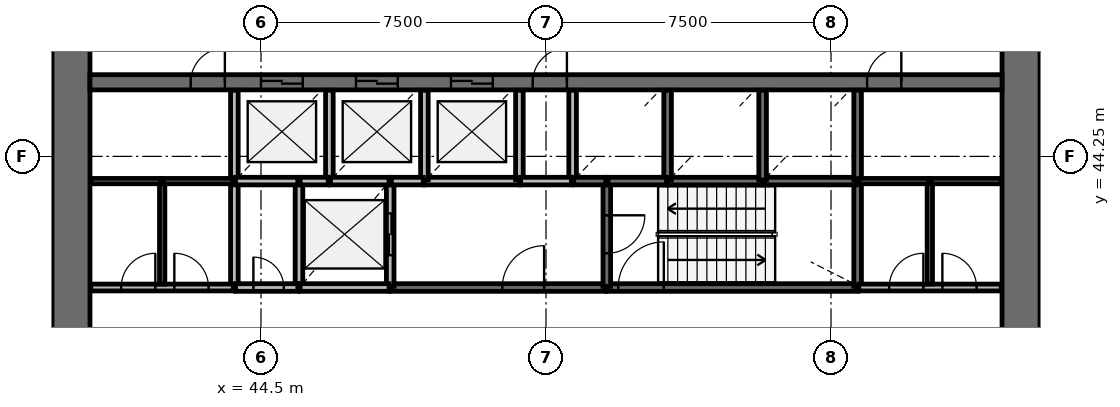
"""IFC4 building model, lengths in metres.
Left out: names, types, materials, properties, quantities, classifications, styles, units other than length and angle.
Written with IfcOpenShell. Run it as: python <this file> out.ifc"""

import sys

from ifc_helpers import new_model, si_unit, direction, frame, frame_2d, origin, place, context, subcontext, project, spatial, rectangle, extrude, source, transform, mapped, element, fill, save


model = new_model("IFC4")
c1 = context("Model", 3, precision=1e-05, world=origin(), true_north=direction((0.0, 1.0)))
c2 = subcontext(c1, "Body", "Model", "MODEL_VIEW")
j1 = project(units=[si_unit("LENGTHUNIT", "METRE"), si_unit("PLANEANGLEUNIT", "RADIAN")], contexts=[c1])
p1 = place(None, origin())
s1 = spatial("IfcSite", under=j1, at=p1, CompositionType="ELEMENT")
p2 = place(p1, origin())
s2 = spatial("IfcBuilding", under=s1, at=p2, CompositionType="ELEMENT")
p3 = place(p2, frame((0.0, 0.0, 66.6)))
s3 = spatial("IfcBuildingStorey", under=s2, at=p3, CompositionType="ELEMENT", Elevation=66.6)
p4 = place(p3, frame((64.5, 38.0, 0.0), z_axis=(0.0, 0.0, 1.0), x_axis=(0.0, 1.0, 0.0)))
e1 = element("IfcWall", 1, at=p4, inside=s3, PredefinedType="SHEAR", context=c2, shape_type="SweptSolid", body=[
    extrude(rectangle(XDim=20.0, YDim=1.0, at=frame_2d((10.0, 0.0))), origin(), (0.0, 0.0, 1.0), 4.4),
])
p5 = place(p4, frame((9.1, 0.0, 0.0)))
e2 = element("IfcOpeningElement", 2, at=p5, cuts=e1, PredefinedType="OPENING", context=c2, shape_type="SweptSolid", body=[
    extrude(rectangle(XDim=1.8, YDim=2.1, at=frame_2d((0.9, 1.05))), frame((0.0, 0.51, 0.0), z_axis=(0.0, -1.0, 0.0), x_axis=(1.0, 0.0, 0.0)), (0.0, 0.0, 1.0), 1.02),
])
p6 = place(p3, frame((39.5, 58.0, 0.0), z_axis=(0.0, 0.0, 1.0), x_axis=(0.0, -1.0, 0.0)))
e3 = element("IfcWall", 3, at=p6, inside=s3, PredefinedType="SHEAR", context=c2, shape_type="SweptSolid", body=[
    extrude(rectangle(XDim=20.0, YDim=1.0, at=frame_2d((10.0, 0.0))), origin(), (0.0, 0.0, 1.0), 4.4),
])
p7 = place(p6, frame((9.1, 0.0, 0.0)))
e4 = element("IfcOpeningElement", 4, at=p7, cuts=e3, PredefinedType="OPENING", context=c2, shape_type="SweptSolid", body=[
    extrude(rectangle(XDim=1.8, YDim=2.1, at=frame_2d((0.9, 1.05))), frame((0.0, 0.51, 0.0), z_axis=(0.0, -1.0, 0.0), x_axis=(1.0, 0.0, 0.0)), (0.0, 0.0, 1.0), 1.02),
])
p8 = place(p3, frame((40.0, 46.2, 0.0), z_axis=(0.0, 0.0, 1.0), x_axis=(1.0, 0.0, 0.0)))
e5 = element("IfcWall", 5, at=p8, inside=s3, PredefinedType="SHEAR", context=c2, shape_type="SweptSolid", body=[
    extrude(rectangle(XDim=24.0, YDim=0.4, at=frame_2d((12.0, 0.0))), origin(), (0.0, 0.0, 1.0), 4.4),
])
p9 = place(p8, frame((4.5, 0.0, 0.0)))
e6 = element("IfcOpeningElement", 6, at=p9, cuts=e5, PredefinedType="OPENING", context=c2, shape_type="SweptSolid", body=[
    extrude(rectangle(XDim=1.1, YDim=2.1, at=frame_2d((0.55, 1.05))), frame((0.0, 0.21, 0.0), z_axis=(0.0, -1.0, 0.0), x_axis=(1.0, 0.0, 0.0)), (0.0, 0.0, 1.0), 0.42),
])
p10 = place(p8, frame((7.0, 0.0, 0.0)))
e7 = element("IfcOpeningElement", 7, at=p10, cuts=e5, PredefinedType="OPENING", context=c2, shape_type="SweptSolid", body=[
    extrude(rectangle(XDim=1.1, YDim=2.1, at=frame_2d((0.55, 1.05))), frame((0.0, 0.21, 0.0), z_axis=(0.0, -1.0, 0.0), x_axis=(1.0, 0.0, 0.0)), (0.0, 0.0, 1.0), 0.42),
])
p11 = place(p8, frame((9.5, 0.0, 0.0)))
e8 = element("IfcOpeningElement", 8, at=p11, cuts=e5, PredefinedType="OPENING", context=c2, shape_type="SweptSolid", body=[
    extrude(rectangle(XDim=1.1, YDim=2.1, at=frame_2d((0.55, 1.05))), frame((0.0, 0.21, 0.0), z_axis=(0.0, -1.0, 0.0), x_axis=(1.0, 0.0, 0.0)), (0.0, 0.0, 1.0), 0.42),
])
p12 = place(p8, frame((20.45, 0.0, 0.0)))
e9 = element("IfcOpeningElement", 9, at=p12, cuts=e5, PredefinedType="OPENING", context=c2, shape_type="SweptSolid", body=[
    extrude(rectangle(XDim=0.9, YDim=2.1, at=frame_2d((0.45, 1.05))), frame((0.0, 0.21, 0.0), z_axis=(0.0, -1.0, 0.0), x_axis=(1.0, 0.0, 0.0)), (0.0, 0.0, 1.0), 0.42),
])
p13 = place(p8, frame((2.65, 0.0, 0.0)))
e10 = element("IfcOpeningElement", 10, at=p13, cuts=e5, PredefinedType="OPENING", context=c2, shape_type="SweptSolid", body=[
    extrude(rectangle(XDim=0.9, YDim=2.1, at=frame_2d((0.45, 1.05))), frame((0.0, 0.21, 0.0), z_axis=(0.0, -1.0, 0.0), x_axis=(1.0, 0.0, 0.0)), (0.0, 0.0, 1.0), 0.42),
])
p14 = place(p8, frame((11.65, 0.0, 0.0)))
e11 = element("IfcOpeningElement", 11, at=p14, cuts=e5, PredefinedType="OPENING", context=c2, shape_type="SweptSolid", body=[
    extrude(rectangle(XDim=0.9, YDim=2.1, at=frame_2d((0.45, 1.05))), frame((0.0, 0.21, 0.0), z_axis=(0.0, -1.0, 0.0), x_axis=(1.0, 0.0, 0.0)), (0.0, 0.0, 1.0), 0.42),
])
p15 = place(p3, frame((53.6, 40.8, 0.0), z_axis=(0.0, 0.0, 1.0), x_axis=(1.0, 0.0, 0.0)))
e12 = element("IfcWall", 12, at=p15, inside=s3, PredefinedType="SOLIDWALL", context=c2, shape_type="SweptSolid", body=[
    extrude(rectangle(XDim=6.6, YDim=0.2, at=frame_2d((3.3, 0.0))), origin(), (0.0, 0.0, 1.0), 3.95),
])
p16 = place(p15, frame((0.3, 0.0, 0.0)))
e13 = element("IfcOpeningElement", 13, at=p16, cuts=e12, PredefinedType="OPENING", context=c2, shape_type="SweptSolid", body=[
    extrude(rectangle(XDim=1.2, YDim=2.1, at=frame_2d((0.6, 1.05))), frame((0.0, 0.11, 0.0), z_axis=(0.0, -1.0, 0.0), x_axis=(1.0, 0.0, 0.0)), (0.0, 0.0, 1.0), 0.22),
])
p17 = place(p3, frame((47.9, 40.8, 0.0), z_axis=(0.0, 0.0, 1.0), x_axis=(1.0, 0.0, 0.0)))
e14 = element("IfcWall", 14, at=p17, inside=s3, PredefinedType="SOLIDWALL", context=c2, shape_type="SweptSolid", body=[
    extrude(rectangle(XDim=5.67, YDim=0.2, at=frame_2d((2.835, 0.0))), origin(), (0.0, 0.0, 1.0), 3.95),
])
p18 = place(p17, frame((2.95, 0.0, 0.0)))
e15 = element("IfcOpeningElement", 15, at=p18, cuts=e14, PredefinedType="OPENING", context=c2, shape_type="SweptSolid", body=[
    extrude(rectangle(XDim=1.1, YDim=2.1, at=frame_2d((0.55, 1.05))), frame((0.0, 0.11, 0.0), z_axis=(0.0, -1.0, 0.0), x_axis=(1.0, 0.0, 0.0)), (0.0, 0.0, 1.0), 0.22),
])
for number, where, z_axis, x_axis in (
    (16, (43.8, 43.6, 0.0), (0.0, 0.0, 1.0), (0.0, -1.0, 0.0)),
    (17, (45.5, 43.6, 0.0), (0.0, 0.0, 1.0), (0.0, -1.0, 0.0)),
):
    element("IfcWall", number, at=place(p3, frame(where, z_axis=z_axis, x_axis=x_axis)), inside=s3, PredefinedType="SOLIDWALL", context=c2, shape_type="SweptSolid", body=[
        extrude(rectangle(XDim=2.8, YDim=0.2, at=frame_2d((1.4, 0.0))), origin(), (0.0, 0.0, 1.0), 3.95),
    ])
p19 = place(p3, frame((47.9, 40.83, 0.0), z_axis=(0.0, 0.0, 1.0), x_axis=(0.0, 1.0, 0.0)))
e18 = element("IfcWall", 18, at=p19, inside=s3, PredefinedType="SOLIDWALL", context=c2, shape_type="SweptSolid", body=[
    extrude(rectangle(XDim=2.77, YDim=0.2, at=frame_2d((1.385, 0.0))), origin(), (0.0, 0.0, 1.0), 3.95),
])
p20 = place(p19, frame((0.82, 0.0, 0.0)))
e19 = element("IfcOpeningElement", 19, at=p20, cuts=e18, PredefinedType="OPENING", context=c2, shape_type="SweptSolid", body=[
    extrude(rectangle(XDim=1.1, YDim=2.1, at=frame_2d((0.55, 1.05))), frame((0.0, 0.11, 0.0), z_axis=(0.0, -1.0, 0.0), x_axis=(1.0, 0.0, 0.0)), (0.0, 0.0, 1.0), 0.22),
])
p21 = place(p3, frame((60.2, 40.83, 0.0), z_axis=(0.0, 0.0, 1.0), x_axis=(0.0, 1.0, 0.0)))
e20 = element("IfcWall", 20, at=p21, inside=s3, PredefinedType="SOLIDWALL", context=c2, shape_type="SweptSolid", body=[
    extrude(rectangle(XDim=2.77, YDim=0.2, at=frame_2d((1.385, 0.0))), origin(), (0.0, 0.0, 1.0), 3.95),
])
p22 = place(p3, frame((53.6, 43.6, 0.0), z_axis=(0.0, 0.0, 1.0), x_axis=(0.0, -1.0, 0.0)))
e21 = element("IfcWall", 21, at=p22, inside=s3, PredefinedType="SOLIDWALL", context=c2, shape_type="SweptSolid", body=[
    extrude(rectangle(XDim=2.77, YDim=0.2, at=frame_2d((1.385, 0.0))), origin(), (0.0, 0.0, 1.0), 3.95),
])
p23 = place(p22, frame((0.9, 0.0, 0.0)))
e22 = element("IfcOpeningElement", 22, at=p23, cuts=e21, PredefinedType="OPENING", context=c2, shape_type="SweptSolid", body=[
    extrude(rectangle(XDim=1.0, YDim=2.1, at=frame_2d((0.5, 1.05))), frame((0.0, 0.11, 0.0), z_axis=(0.0, -1.0, 0.0), x_axis=(1.0, 0.0, 0.0)), (0.0, 0.0, 1.0), 0.22),
])
for number, where, z_axis, x_axis in (
    (23, (48.8, 43.6, 0.0), (0.0, 0.0, 1.0), (1.0, 0.0, 0.0)),
    (24, (55.2, 43.6, 0.0), (0.0, 0.0, 1.0), (1.0, 0.0, 0.0)),
):
    element("IfcWall", number, at=place(p3, frame(where, z_axis=z_axis, x_axis=x_axis)), inside=s3, PredefinedType="SOLIDWALL", context=c2, shape_type="SweptSolid", body=[
        extrude(rectangle(XDim=2.5, YDim=0.2, at=frame_2d((1.25, 0.0))), origin(), (0.0, 0.0, 1.0), 3.95),
    ])
p24 = place(p3, frame((57.73, 43.6, 0.0), z_axis=(0.0, 0.0, 1.0), x_axis=(1.0, 0.0, 0.0)))
e25 = element("IfcWall", 25, at=p24, inside=s3, PredefinedType="SOLIDWALL", context=c2, shape_type="SweptSolid", body=[
    extrude(rectangle(XDim=2.44, YDim=0.2, at=frame_2d((1.22, 0.0))), origin(), (0.0, 0.0, 1.0), 3.95),
])
p25 = place(p3, frame((45.53, 40.8, 0.0), z_axis=(0.0, 0.0, 1.0), x_axis=(1.0, 0.0, 0.0)))
e26 = element("IfcWall", 26, at=p25, inside=s3, PredefinedType="SOLIDWALL", context=c2, shape_type="SweptSolid", body=[
    extrude(rectangle(XDim=2.34, YDim=0.2, at=frame_2d((1.17, 0.0))), origin(), (0.0, 0.0, 1.0), 3.95),
])
p26 = place(p3, frame((43.8, 45.99, 0.0), z_axis=(0.0, 0.0, 1.0), x_axis=(0.0, -1.0, 0.0)))
e27 = element("IfcWall", 27, at=p26, inside=s3, PredefinedType="SOLIDWALL", context=c2, shape_type="SweptSolid", body=[
    extrude(rectangle(XDim=2.36, YDim=0.2, at=frame_2d((1.18, 0.0))), origin(), (0.0, 0.0, 1.0), 3.95),
])
p27 = place(p3, frame((46.3, 43.6, 0.0), z_axis=(0.0, 0.0, 1.0), x_axis=(0.0, 1.0, 0.0)))
e28 = element("IfcWall", 28, at=p27, inside=s3, PredefinedType="SOLIDWALL", context=c2, shape_type="SweptSolid", body=[
    extrude(rectangle(XDim=2.39, YDim=0.2, at=frame_2d((1.195, 0.0))), origin(), (0.0, 0.0, 1.0), 3.95),
])
for number, where, z_axis, x_axis in (
    (29, (48.8, 43.63, 0.0), (0.0, 0.0, 1.0), (0.0, 1.0, 0.0)),
    (30, (51.3, 43.63, 0.0), (0.0, 0.0, 1.0), (0.0, 1.0, 0.0)),
):
    element("IfcWall", number, at=place(p3, frame(where, z_axis=z_axis, x_axis=x_axis)), inside=s3, PredefinedType="SOLIDWALL", context=c2, shape_type="SweptSolid", body=[
        extrude(rectangle(XDim=2.36, YDim=0.2, at=frame_2d((1.18, 0.0))), origin(), (0.0, 0.0, 1.0), 3.95),
    ])
p28 = place(p3, frame((52.7, 45.99, 0.0), z_axis=(0.0, 0.0, 1.0), x_axis=(0.0, -1.0, 0.0)))
e31 = element("IfcWall", 31, at=p28, inside=s3, PredefinedType="SOLIDWALL", context=c2, shape_type="SweptSolid", body=[
    extrude(rectangle(XDim=2.39, YDim=0.2, at=frame_2d((1.195, 0.0))), origin(), (0.0, 0.0, 1.0), 3.95),
])
for number, where, z_axis, x_axis in (
    (32, (55.2, 43.63, 0.0), (0.0, 0.0, 1.0), (0.0, 1.0, 0.0)),
    (33, (57.7, 43.63, 0.0), (0.0, 0.0, 1.0), (0.0, 1.0, 0.0)),
    (34, (60.2, 43.63, 0.0), (0.0, 0.0, 1.0), (0.0, 1.0, 0.0)),
):
    element("IfcWall", number, at=place(p3, frame(where, z_axis=z_axis, x_axis=x_axis)), inside=s3, PredefinedType="SOLIDWALL", context=c2, shape_type="SweptSolid", body=[
        extrude(rectangle(XDim=2.36, YDim=0.2, at=frame_2d((1.18, 0.0))), origin(), (0.0, 0.0, 1.0), 3.95),
    ])
p29 = place(p3, frame((43.83, 43.6, 0.0), z_axis=(0.0, 0.0, 1.0), x_axis=(1.0, 0.0, 0.0)))
e35 = element("IfcWall", 35, at=p29, inside=s3, PredefinedType="SOLIDWALL", context=c2, shape_type="SweptSolid", body=[
    extrude(rectangle(XDim=1.64, YDim=0.2, at=frame_2d((0.82, 0.0))), origin(), (0.0, 0.0, 1.0), 3.95),
])
p30 = place(p3, frame((43.83, 40.8, 0.0), z_axis=(0.0, 0.0, 1.0), x_axis=(1.0, 0.0, 0.0)))
e36 = element("IfcWall", 36, at=p30, inside=s3, PredefinedType="SOLIDWALL", context=c2, shape_type="SweptSolid", body=[
    extrude(rectangle(XDim=1.64, YDim=0.2, at=frame_2d((0.82, 0.0))), origin(), (0.0, 0.0, 1.0), 3.95),
])
p31 = place(p30, frame((0.47, 0.0, 0.0)))
e37 = element("IfcOpeningElement", 37, at=p31, cuts=e36, PredefinedType="OPENING", context=c2, shape_type="SweptSolid", body=[
    extrude(rectangle(XDim=0.8, YDim=2.1, at=frame_2d((0.4, 1.05))), frame((0.0, 0.11, 0.0), z_axis=(0.0, -1.0, 0.0), x_axis=(1.0, 0.0, 0.0)), (0.0, 0.0, 1.0), 0.22),
])
for number, where, z_axis, x_axis in (
    (38, (46.33, 43.6, 0.0), (0.0, 0.0, 1.0), (1.0, 0.0, 0.0)),
    (39, (53.63, 43.6, 0.0), (0.0, 0.0, 1.0), (1.0, 0.0, 0.0)),
):
    element("IfcWall", number, at=place(p3, frame(where, z_axis=z_axis, x_axis=x_axis)), inside=s3, PredefinedType="SOLIDWALL", context=c2, shape_type="SweptSolid", body=[
        extrude(rectangle(XDim=1.54, YDim=0.2, at=frame_2d((0.77, 0.0))), origin(), (0.0, 0.0, 1.0), 3.95),
    ])
p32 = place(p3, frame((52.67, 43.6, 0.0), z_axis=(0.0, 0.0, 1.0), x_axis=(-1.0, 0.0, 0.0)))
e40 = element("IfcWall", 40, at=p32, inside=s3, PredefinedType="SOLIDWALL", context=c2, shape_type="SweptSolid", body=[
    extrude(rectangle(XDim=1.34, YDim=0.2, at=frame_2d((0.67, 0.0))), origin(), (0.0, 0.0, 1.0), 3.95),
])
for number, where, z_axis, x_axis in (
    (41, (47.93, 43.6, 0.0), (0.0, 0.0, 1.0), (1.0, 0.0, 0.0)),
    (42, (52.73, 43.6, 0.0), (0.0, 0.0, 1.0), (1.0, 0.0, 0.0)),
):
    element("IfcWall", number, at=place(p3, frame(where, z_axis=z_axis, x_axis=x_axis)), inside=s3, PredefinedType="SOLIDWALL", context=c2, shape_type="SweptSolid", body=[
        extrude(rectangle(XDim=0.84, YDim=0.2, at=frame_2d((0.42, 0.0))), origin(), (0.0, 0.0, 1.0), 3.95),
    ])
p33 = place(p3, frame((45.53, 43.6, 0.0), z_axis=(0.0, 0.0, 1.0), x_axis=(1.0, 0.0, 0.0)))
e43 = element("IfcWall", 43, at=p33, inside=s3, PredefinedType="SOLIDWALL", context=c2, shape_type="SweptSolid", body=[
    extrude(rectangle(XDim=0.74, YDim=0.2, at=frame_2d((0.37, 0.0))), origin(), (0.0, 0.0, 1.0), 3.95),
])
p34 = place(p3, frame((40.02, 40.8, 0.0), z_axis=(0.0, 0.0, 1.0), x_axis=(1.0, 0.0, 0.0)))
e44 = element("IfcWall", 44, at=p34, inside=s3, PredefinedType="PARTITIONING", context=c2, shape_type="SweptSolid", body=[
    extrude(rectangle(XDim=3.75, YDim=0.18, at=frame_2d((1.875, 0.0))), origin(), (0.0, 0.0, 1.0), 3.95),
])
p35 = place(p34, frame((0.8, 0.0, 0.0)))
e45 = element("IfcOpeningElement", 45, at=p35, cuts=e44, PredefinedType="OPENING", context=c2, shape_type="SweptSolid", body=[
    extrude(rectangle(XDim=0.9, YDim=2.1, at=frame_2d((0.45, 1.05))), frame((0.0, 0.1, 0.0), z_axis=(0.0, -1.0, 0.0), x_axis=(1.0, 0.0, 0.0)), (0.0, 0.0, 1.0), 0.2),
])
p36 = place(p34, frame((2.2, 0.0, 0.0)))
e46 = element("IfcOpeningElement", 46, at=p36, cuts=e44, PredefinedType="OPENING", context=c2, shape_type="SweptSolid", body=[
    extrude(rectangle(XDim=0.9, YDim=2.1, at=frame_2d((0.45, 1.05))), frame((0.0, 0.1, 0.0), z_axis=(0.0, -1.0, 0.0), x_axis=(1.0, 0.0, 0.0)), (0.0, 0.0, 1.0), 0.2),
])
p37 = place(p3, frame((60.23, 40.8, 0.0), z_axis=(0.0, 0.0, 1.0), x_axis=(1.0, 0.0, 0.0)))
e47 = element("IfcWall", 47, at=p37, inside=s3, PredefinedType="PARTITIONING", context=c2, shape_type="SweptSolid", body=[
    extrude(rectangle(XDim=3.75, YDim=0.18, at=frame_2d((1.875, 0.0))), origin(), (0.0, 0.0, 1.0), 3.95),
])
p38 = place(p37, frame((0.8, 0.0, 0.0)))
e48 = element("IfcOpeningElement", 48, at=p38, cuts=e47, PredefinedType="OPENING", context=c2, shape_type="SweptSolid", body=[
    extrude(rectangle(XDim=0.9, YDim=2.1, at=frame_2d((0.45, 1.05))), frame((0.0, 0.1, 0.0), z_axis=(0.0, -1.0, 0.0), x_axis=(1.0, 0.0, 0.0)), (0.0, 0.0, 1.0), 0.2),
])
p39 = place(p37, frame((2.2, 0.0, 0.0)))
e49 = element("IfcOpeningElement", 49, at=p39, cuts=e47, PredefinedType="OPENING", context=c2, shape_type="SweptSolid", body=[
    extrude(rectangle(XDim=0.9, YDim=2.1, at=frame_2d((0.45, 1.05))), frame((0.0, 0.1, 0.0), z_axis=(0.0, -1.0, 0.0), x_axis=(1.0, 0.0, 0.0)), (0.0, 0.0, 1.0), 0.2),
])
for number, where, z_axis, x_axis in (
    (50, (41.9, 40.89, 0.0), (0.0, 0.0, 1.0), (0.0, 1.0, 0.0)),
    (51, (62.1, 40.89, 0.0), (0.0, 0.0, 1.0), (0.0, 1.0, 0.0)),
):
    element("IfcWall", number, at=place(p3, frame(where, z_axis=z_axis, x_axis=x_axis)), inside=s3, PredefinedType="PARTITIONING", context=c2, shape_type="SweptSolid", body=[
        extrude(rectangle(XDim=2.71, YDim=0.14, at=frame_2d((1.355, 0.0))), origin(), (0.0, 0.0, 1.0), 3.05),
    ])
for number, where, z_axis, x_axis in (
    (52, (43.77, 43.6, 0.0), (0.0, 0.0, 1.0), (-1.0, 0.0, 0.0)),
    (53, (60.23, 43.6, 0.0), (0.0, 0.0, 1.0), (1.0, 0.0, 0.0)),
):
    element("IfcWall", number, at=place(p3, frame(where, z_axis=z_axis, x_axis=x_axis)), inside=s3, PredefinedType="PARTITIONING", context=c2, shape_type="SweptSolid", body=[
        extrude(rectangle(XDim=1.84, YDim=0.14, at=frame_2d((0.92, 0.0))), origin(), (0.0, 0.0, 1.0), 3.05),
    ])
for number, where, z_axis, x_axis in (
    (54, (41.87, 43.6, 0.0), (0.0, 0.0, 1.0), (-1.0, 0.0, 0.0)),
    (55, (62.13, 43.6, 0.0), (0.0, 0.0, 1.0), (1.0, 0.0, 0.0)),
):
    element("IfcWall", number, at=place(p3, frame(where, z_axis=z_axis, x_axis=x_axis)), inside=s3, PredefinedType="PARTITIONING", context=c2, shape_type="SweptSolid", body=[
        extrude(rectangle(XDim=1.85, YDim=0.14, at=frame_2d((0.925, 0.0))), origin(), (0.0, 0.0, 1.0), 3.05),
    ])
m1 = source(origin(), c2, "Body", "SweptSolid", [
    extrude(rectangle(XDim=1.1, YDim=2.1, at=frame_2d((0.55, 1.05))), frame((0.0, 0.025, 0.0), z_axis=(0.0, -1.0, 0.0), x_axis=(1.0, 0.0, 0.0)), (0.0, 0.0, 1.0), 0.05),
])
p40 = place(p9, origin())
e56 = element("IfcDoor", 56, at=p40, inside=s3, OperationType="DOUBLE_DOOR_SLIDING", PredefinedType="USERDEFINED", context=c2, shape_type="MappedRepresentation", body=[
    mapped(m1, transform((0.0, 0.0, 0.0), scale=1.0)),
])
fill(e6, e56)
p41 = place(p10, origin())
e57 = element("IfcDoor", 57, at=p41, inside=s3, OperationType="DOUBLE_DOOR_SLIDING", PredefinedType="USERDEFINED", context=c2, shape_type="MappedRepresentation", body=[
    mapped(m1, transform((0.0, 0.0, 0.0), scale=1.0)),
])
fill(e7, e57)
p42 = place(p11, origin())
e58 = element("IfcDoor", 58, at=p42, inside=s3, OperationType="DOUBLE_DOOR_SLIDING", PredefinedType="USERDEFINED", context=c2, shape_type="MappedRepresentation", body=[
    mapped(m1, transform((0.0, 0.0, 0.0), scale=1.0)),
])
fill(e8, e58)
p43 = place(p20, origin())
e59 = element("IfcDoor", 59, at=p43, inside=s3, OperationType="DOUBLE_DOOR_SLIDING", PredefinedType="USERDEFINED", context=c2, shape_type="MappedRepresentation", body=[
    mapped(m1, transform((0.0, 0.0, 0.0), scale=1.0)),
])
fill(e19, e59)
m2 = source(origin(), c2, "Body", "SweptSolid", [
    extrude(rectangle(XDim=1.2, YDim=2.1, at=frame_2d((0.6, 1.05))), frame((0.0, 0.025, 0.0), z_axis=(0.0, -1.0, 0.0), x_axis=(1.0, 0.0, 0.0)), (0.0, 0.0, 1.0), 0.05),
])
p44 = place(p16, origin())
e60 = element("IfcDoor", 60, at=p44, inside=s3, OperationType="SINGLE_SWING_RIGHT", PredefinedType="DOOR", context=c2, shape_type="MappedRepresentation", body=[
    mapped(m2, transform((0.0, 0.0, 0.0), scale=1.0)),
])
fill(e13, e60)
m3 = source(origin(), c2, "Body", "SweptSolid", [
    extrude(rectangle(XDim=1.0, YDim=2.1, at=frame_2d((0.5, 1.05))), frame((0.0, 0.025, 0.0), z_axis=(0.0, -1.0, 0.0), x_axis=(1.0, 0.0, 0.0)), (0.0, 0.0, 1.0), 0.05),
])
p45 = place(p23, origin())
e61 = element("IfcDoor", 61, at=p45, inside=s3, OperationType="SINGLE_SWING_LEFT", PredefinedType="DOOR", context=c2, shape_type="MappedRepresentation", body=[
    mapped(m3, transform((0.0, 0.0, 0.0), scale=1.0)),
])
fill(e22, e61)
m4 = source(origin(), c2, "Body", "SweptSolid", [
    extrude(rectangle(XDim=1.1, YDim=2.1, at=frame_2d((0.55, 1.05))), frame((0.0, 0.025, 0.0), z_axis=(0.0, -1.0, 0.0), x_axis=(1.0, 0.0, 0.0)), (0.0, 0.0, 1.0), 0.05),
])
p46 = place(p18, origin())
e62 = element("IfcDoor", 62, at=p46, inside=s3, OperationType="SINGLE_SWING_RIGHT", PredefinedType="DOOR", context=c2, shape_type="MappedRepresentation", body=[
    mapped(m4, transform((0.0, 0.0, 0.0), scale=1.0)),
])
fill(e15, e62)
m5 = source(origin(), c2, "Body", "SweptSolid", [
    extrude(rectangle(XDim=0.8, YDim=2.1, at=frame_2d((0.4, 1.05))), frame((0.0, 0.025, 0.0), z_axis=(0.0, -1.0, 0.0), x_axis=(1.0, 0.0, 0.0)), (0.0, 0.0, 1.0), 0.05),
])
p47 = place(p31, origin())
e63 = element("IfcDoor", 63, at=p47, inside=s3, OperationType="SINGLE_SWING_LEFT", PredefinedType="DOOR", context=c2, shape_type="MappedRepresentation", body=[
    mapped(m5, transform((0.0, 0.0, 0.0), scale=1.0)),
])
fill(e37, e63)
m6 = source(origin(), c2, "Body", "SweptSolid", [
    extrude(rectangle(XDim=0.9, YDim=2.1, at=frame_2d((0.45, 1.05))), frame((0.0, 0.025, 0.0), z_axis=(0.0, -1.0, 0.0), x_axis=(1.0, 0.0, 0.0)), (0.0, 0.0, 1.0), 0.05),
])
p48 = place(p35, origin())
e64 = element("IfcDoor", 64, at=p48, inside=s3, OperationType="SINGLE_SWING_RIGHT", PredefinedType="DOOR", context=c2, shape_type="MappedRepresentation", body=[
    mapped(m6, transform((0.0, 0.0, 0.0), scale=1.0)),
])
fill(e45, e64)
p49 = place(p36, origin())
e65 = element("IfcDoor", 65, at=p49, inside=s3, OperationType="SINGLE_SWING_LEFT", PredefinedType="DOOR", context=c2, shape_type="MappedRepresentation", body=[
    mapped(m6, transform((0.0, 0.0, 0.0), scale=1.0)),
])
fill(e46, e65)
p50 = place(p12, origin())
e66 = element("IfcDoor", 66, at=p50, inside=s3, OperationType="SINGLE_SWING_RIGHT", PredefinedType="DOOR", context=c2, shape_type="MappedRepresentation", body=[
    mapped(m6, transform((0.0, 0.0, 0.0), scale=1.0)),
])
fill(e9, e66)
p51 = place(p38, origin())
e67 = element("IfcDoor", 67, at=p51, inside=s3, OperationType="SINGLE_SWING_RIGHT", PredefinedType="DOOR", context=c2, shape_type="MappedRepresentation", body=[
    mapped(m6, transform((0.0, 0.0, 0.0), scale=1.0)),
])
fill(e48, e67)
p52 = place(p39, origin())
e68 = element("IfcDoor", 68, at=p52, inside=s3, OperationType="SINGLE_SWING_LEFT", PredefinedType="DOOR", context=c2, shape_type="MappedRepresentation", body=[
    mapped(m6, transform((0.0, 0.0, 0.0), scale=1.0)),
])
fill(e49, e68)
p53 = place(p13, origin())
e69 = element("IfcDoor", 69, at=p53, inside=s3, OperationType="SINGLE_SWING_RIGHT", PredefinedType="DOOR", context=c2, shape_type="MappedRepresentation", body=[
    mapped(m6, transform((0.0, 0.0, 0.0), scale=1.0)),
])
fill(e10, e69)
p54 = place(p14, origin())
e70 = element("IfcDoor", 70, at=p54, inside=s3, OperationType="SINGLE_SWING_RIGHT", PredefinedType="DOOR", context=c2, shape_type="MappedRepresentation", body=[
    mapped(m6, transform((0.0, 0.0, 0.0), scale=1.0)),
])
fill(e11, e70)
save(model, sys.argv[1])
